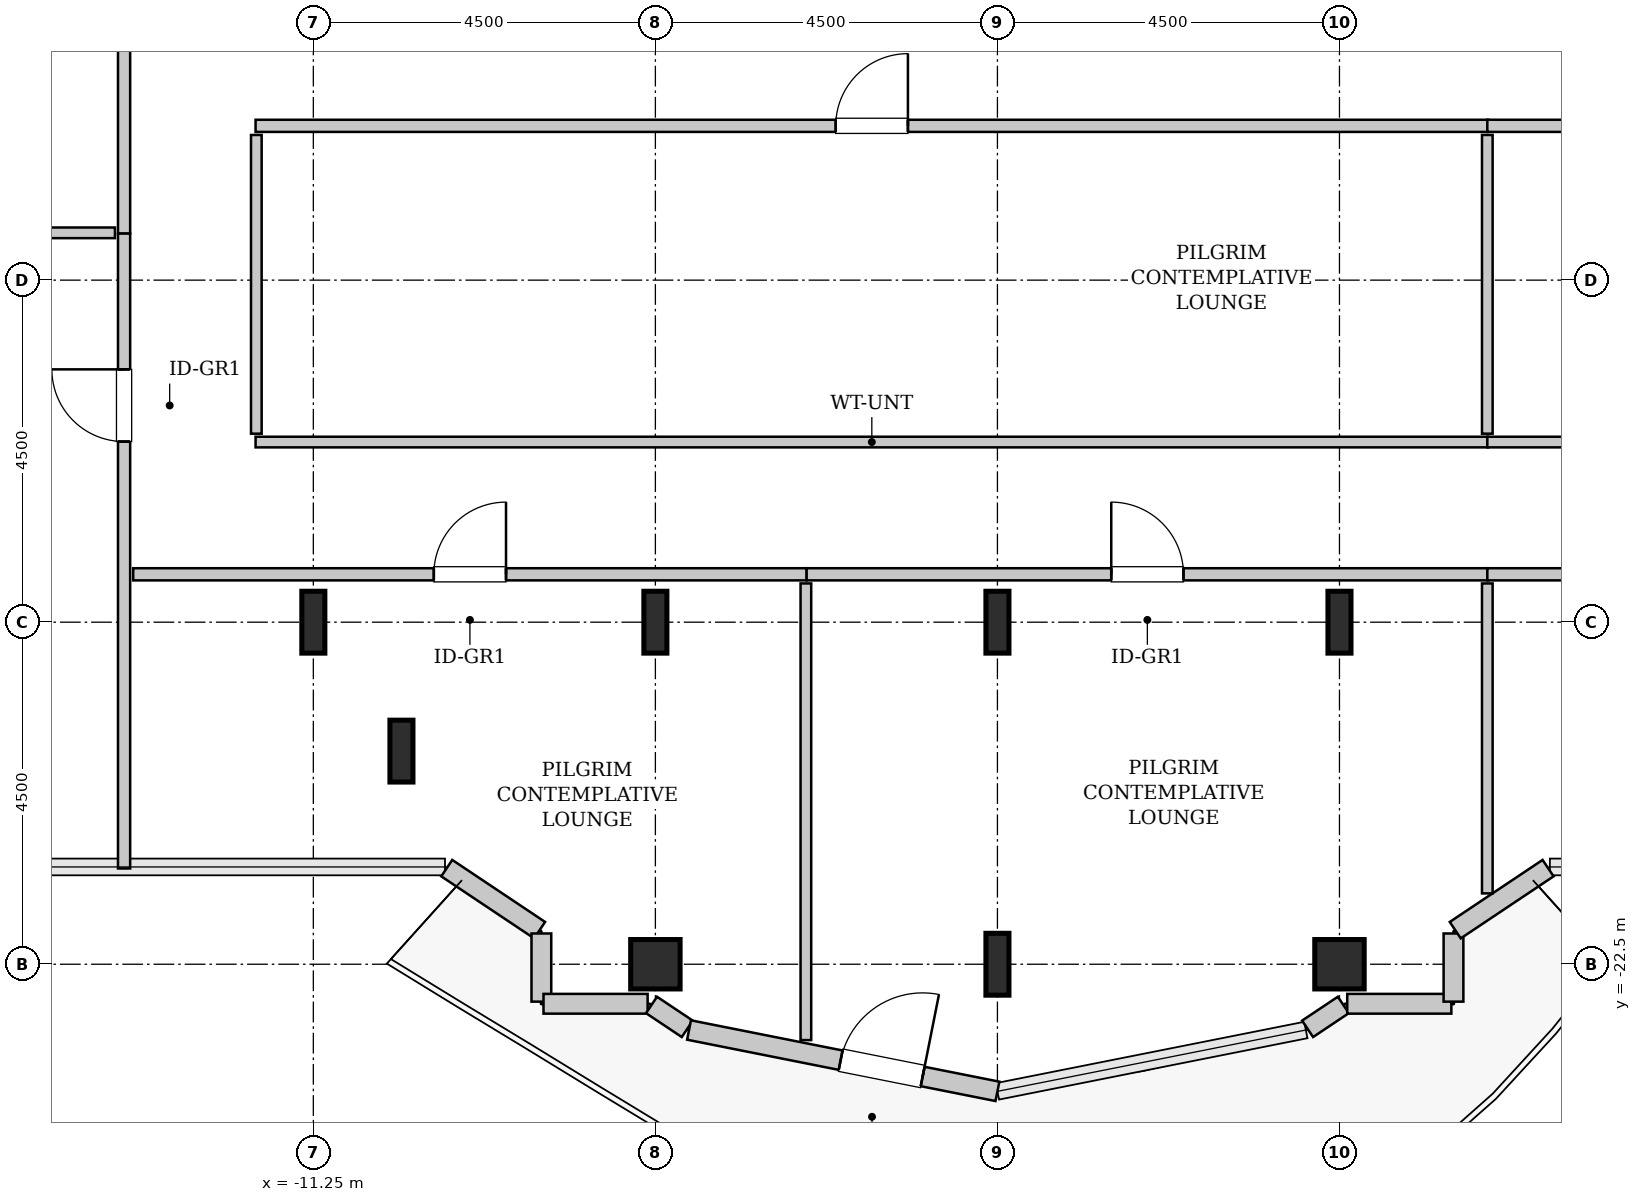
"""IFC4 building model, lengths in metres.
Left out: names, types, materials, properties, quantities, classifications, styles, units other than length and angle.
Written with IfcOpenShell. Run it as: python <this file> out.ifc"""

import sys

from ifc_helpers import new_model, si_unit, direction, frame, frame_2d, origin, origin_2d, place, context, subcontext, project, spatial, rectangle, hollow_rectangle, i_section, extrude, source, transform, mapped, element, fill, save


model = new_model("IFC4")
c1 = context("Model", 3, precision=1e-05, world=origin(), true_north=direction((0.0, 1.0)))
c2 = subcontext(c1, "Body", "Model", "MODEL_VIEW")
j1 = project(units=[si_unit("LENGTHUNIT", "METRE"), si_unit("PLANEANGLEUNIT", "RADIAN")], contexts=[c1])
p1 = place(None, origin())
s1 = spatial("IfcSite", under=j1, at=p1, CompositionType="ELEMENT")
p2 = place(p1, origin())
s2 = spatial("IfcBuilding", under=s1, at=p2, CompositionType="ELEMENT")
p3 = place(p2, frame((0.0, 0.0, 218.0)))
s3 = spatial("IfcBuildingStorey", under=s2, at=p3, CompositionType="ELEMENT", Elevation=218.0)
m1 = source(origin(), c2, "Body", "SweptSolid", [
    extrude(i_section(OverallWidth=0.303, OverallDepth=0.814, WebThickness=0.021, FlangeThickness=0.04, FilletRadius=0.03, at=origin_2d()), origin(), (0.0, 0.0, 1.0), 3.8),
])
for number, where, z_axis, x_axis in (
    (1, (-11.25, -18.0, 0.0), (0.0, 0.0, 1.0), (1.0, 0.0, 0.0)),
    (2, (-10.091, -19.696, 0.0), (0.0, 0.0, 1.0), (1.0, 0.0, 0.0)),
):
    element("IfcColumn", number, at=place(p3, frame(where, z_axis=z_axis, x_axis=x_axis)), inside=s3, PredefinedType="COLUMN", context=c2, shape_type="MappedRepresentation", body=[
        mapped(m1, transform((0.0, 0.0, 0.0), x_axis=(1.0, 0.0, 0.0), y_axis=(0.0, 1.0, 0.0), z_axis=(0.0, 0.0, 1.0), scale=1.0)),
    ])
m2 = source(origin(), c2, "Body", "SweptSolid", [
    extrude(hollow_rectangle(XDim=0.65, YDim=0.65, WallThickness=0.032, InnerFilletRadius=0.032, OuterFilletRadius=0.064, at=origin_2d()), origin(), (0.0, 0.0, 1.0), 3.8),
])
p4 = place(p3, frame((-6.75, -22.5, 0.0), z_axis=(0.0, 0.0, 1.0), x_axis=(1.0, 0.0, 0.0)))
e3 = element("IfcColumn", 3, at=p4, inside=s3, PredefinedType="COLUMN", context=c2, shape_type="MappedRepresentation", body=[
    mapped(m2, transform((0.0, 0.0, 0.0), x_axis=(1.0, 0.0, 0.0), y_axis=(0.0, 1.0, 0.0), z_axis=(0.0, 0.0, 1.0), scale=1.0)),
])
for number, where, z_axis, x_axis in (
    (4, (-6.75, -18.0, 0.0), (0.0, 0.0, 1.0), (1.0, 0.0, 0.0)),
    (5, (-2.25, -22.5, 0.0), (0.0, 0.0, 1.0), (1.0, 0.0, 0.0)),
    (6, (-2.25, -18.0, 0.0), (0.0, 0.0, 1.0), (1.0, 0.0, 0.0)),
):
    element("IfcColumn", number, at=place(p3, frame(where, z_axis=z_axis, x_axis=x_axis)), inside=s3, PredefinedType="COLUMN", context=c2, shape_type="MappedRepresentation", body=[
        mapped(m1, transform((0.0, 0.0, 0.0), x_axis=(1.0, 0.0, 0.0), y_axis=(0.0, 1.0, 0.0), z_axis=(0.0, 0.0, 1.0), scale=1.0)),
    ])
p5 = place(p3, frame((2.25, -22.5, 0.0), z_axis=(0.0, 0.0, 1.0), x_axis=(1.0, 0.0, 0.0)))
e7 = element("IfcColumn", 7, at=p5, inside=s3, PredefinedType="COLUMN", context=c2, shape_type="MappedRepresentation", body=[
    mapped(m2, transform((0.0, 0.0, 0.0), x_axis=(1.0, 0.0, 0.0), y_axis=(0.0, 1.0, 0.0), z_axis=(0.0, 0.0, 1.0), scale=1.0)),
])
p6 = place(p3, frame((2.25, -18.0, 0.0), z_axis=(0.0, 0.0, 1.0), x_axis=(1.0, 0.0, 0.0)))
e8 = element("IfcColumn", 8, at=p6, inside=s3, PredefinedType="COLUMN", context=c2, shape_type="MappedRepresentation", body=[
    mapped(m1, transform((0.0, 0.0, 0.0), x_axis=(1.0, 0.0, 0.0), y_axis=(0.0, 1.0, 0.0), z_axis=(0.0, 0.0, 1.0), scale=1.0)),
])
m3 = source(origin(), c2, "Body", "SweptSolid", [
    extrude(rectangle(XDim=1.469, YDim=0.26, at=frame_2d((0.734, 0.0))), origin(), (0.0, 0.0, 1.0), 3.55),
])
p7 = place(p3, frame((-9.495, -21.236, 0.0), z_axis=(0.0, 0.0, 1.0), x_axis=(0.831461760506, -0.555581983884, 0.0)))
e9 = element("IfcWall", 9, at=p7, inside=s3, PredefinedType="SOLIDWALL", context=c2, shape_type="MappedRepresentation", body=[
    mapped(m3, transform((0.0, 0.0, 0.0), x_axis=(1.0, 0.0, 0.0), y_axis=(0.0, 1.0, 0.0), z_axis=(0.0, 0.0, 1.0), scale=1.0)),
])
m4 = source(origin(), c2, "Body", "SweptSolid", [
    extrude(rectangle(XDim=0.897, YDim=0.26, at=frame_2d((0.448, 0.0))), origin(), (0.0, 0.0, 1.0), 3.55),
])
p8 = place(p3, frame((-8.25, -22.095, 0.0), z_axis=(0.0, 0.0, 1.0), x_axis=(0.0, -1.0, 0.0)))
e10 = element("IfcWall", 10, at=p8, inside=s3, PredefinedType="SOLIDWALL", context=c2, shape_type="MappedRepresentation", body=[
    mapped(m4, transform((0.0, 0.0, 0.0), x_axis=(1.0, 0.0, 0.0), y_axis=(0.0, 1.0, 0.0), z_axis=(0.0, 0.0, 1.0), scale=1.0)),
])
m5 = source(origin(), c2, "Body", "SweptSolid", [
    extrude(rectangle(XDim=1.37, YDim=0.26, at=frame_2d((0.685, 0.0))), origin(), (0.0, 0.0, 1.0), 3.55),
])
p9 = place(p3, frame((-8.222, -23.02, 0.0), z_axis=(0.0, 0.0, 1.0), x_axis=(1.0, 0.0, 0.0)))
e11 = element("IfcWall", 11, at=p9, inside=s3, PredefinedType="SOLIDWALL", context=c2, shape_type="MappedRepresentation", body=[
    mapped(m5, transform((0.0, 0.0, 0.0), x_axis=(1.0, 0.0, 0.0), y_axis=(0.0, 1.0, 0.0), z_axis=(0.0, 0.0, 1.0), scale=1.0)),
])
m6 = source(origin(), c2, "Body", "SweptSolid", [
    extrude(rectangle(XDim=0.565, YDim=0.26, at=frame_2d((0.283, 0.0))), origin(), (0.0, 0.0, 1.0), 3.55),
])
p10 = place(p3, frame((-6.801, -23.036, 0.0), z_axis=(0.0, 0.0, 1.0), x_axis=(0.831651492666, -0.555297933317, 0.0)))
e12 = element("IfcWall", 12, at=p10, inside=s3, PredefinedType="SOLIDWALL", context=c2, shape_type="MappedRepresentation", body=[
    mapped(m6, transform((0.0, 0.0, 0.0), x_axis=(1.0, 0.0, 0.0), y_axis=(0.0, 1.0, 0.0), z_axis=(0.0, 0.0, 1.0), scale=1.0)),
])
m7 = source(origin(), c2, "Body", "SweptSolid", [
    extrude(rectangle(XDim=4.137, YDim=0.26, at=frame_2d((2.068, 0.0))), origin(), (0.0, 0.0, 1.0), 3.55),
])
p11 = place(p3, frame((-6.307, -23.365, 0.0), z_axis=(0.0, 0.0, 1.0), x_axis=(0.980782170794, -0.195105954428, 0.0)))
e13 = element("IfcWall", 13, at=p11, inside=s3, PredefinedType="SOLIDWALL", context=c2, shape_type="MappedRepresentation", body=[
    mapped(m7, transform((0.0, 0.0, 0.0), x_axis=(1.0, 0.0, 0.0), y_axis=(0.0, 1.0, 0.0), z_axis=(0.0, 0.0, 1.0), scale=1.0)),
])
p12 = place(p11, frame((2.034, 0.0, 0.0)))
e14 = element("IfcOpeningElement", 14, at=p12, cuts=e13, PredefinedType="OPENING", context=c2, shape_type="SweptSolid", body=[
    extrude(rectangle(XDim=1.1, YDim=2.2, at=frame_2d((0.55, 1.1))), frame((0.0, 0.14, 0.0), z_axis=(0.0, -1.0, 0.0), x_axis=(1.0, 0.0, 0.0)), (0.0, 0.0, 1.0), 0.28),
])
p13 = place(p3, frame((1.831, -23.35, 0.0), z_axis=(0.0, 0.0, 1.0), x_axis=(0.831651492666, 0.555297933317, 0.0)))
e15 = element("IfcWall", 15, at=p13, inside=s3, PredefinedType="SOLIDWALL", context=c2, shape_type="MappedRepresentation", body=[
    mapped(m6, transform((0.0, 0.0, 0.0), x_axis=(1.0, 0.0, 0.0), y_axis=(0.0, 1.0, 0.0), z_axis=(0.0, 0.0, 1.0), scale=1.0)),
])
p14 = place(p3, frame((2.352, -23.02, 0.0), z_axis=(0.0, 0.0, 1.0), x_axis=(1.0, 0.0, 0.0)))
e16 = element("IfcWall", 16, at=p14, inside=s3, PredefinedType="SOLIDWALL", context=c2, shape_type="MappedRepresentation", body=[
    mapped(m5, transform((0.0, 0.0, 0.0), x_axis=(1.0, 0.0, 0.0), y_axis=(0.0, 1.0, 0.0), z_axis=(0.0, 0.0, 1.0), scale=1.0)),
])
p15 = place(p3, frame((3.75, -22.992, 0.0), z_axis=(0.0, 0.0, 1.0), x_axis=(0.0, 1.0, 0.0)))
e17 = element("IfcWall", 17, at=p15, inside=s3, PredefinedType="SOLIDWALL", context=c2, shape_type="MappedRepresentation", body=[
    mapped(m4, transform((0.0, 0.0, 0.0), x_axis=(1.0, 0.0, 0.0), y_axis=(0.0, 1.0, 0.0), z_axis=(0.0, 0.0, 1.0), scale=1.0)),
])
p16 = place(p3, frame((3.773, -22.052, 0.0), z_axis=(0.0, 0.0, 1.0), x_axis=(0.831461760506, 0.555581983884, 0.0)))
e18 = element("IfcWall", 18, at=p16, inside=s3, PredefinedType="SOLIDWALL", context=c2, shape_type="MappedRepresentation", body=[
    mapped(m3, transform((0.0, 0.0, 0.0), x_axis=(1.0, 0.0, 0.0), y_axis=(0.0, 1.0, 0.0), z_axis=(0.0, 0.0, 1.0), scale=1.0)),
])
m8 = source(origin(), c2, "Body", "SweptSolid", [
    extrude(rectangle(XDim=10.093, YDim=0.16, at=frame_2d((5.046, 0.0))), origin(), (0.0, 0.0, 1.0), 3.535),
])
p17 = place(p3, frame((-13.74, -12.887, 0.0), z_axis=(0.0, 0.0, 1.0), x_axis=(0.0, 1.0, 0.0)))
e19 = element("IfcWall", 19, at=p17, inside=s3, PredefinedType="PARTITIONING", context=c2, shape_type="MappedRepresentation", body=[
    mapped(m8, transform((0.0, 0.0, 0.0), x_axis=(1.0, 0.0, 0.0), y_axis=(0.0, 1.0, 0.0), z_axis=(0.0, 0.0, 1.0), scale=1.0)),
])
p18 = place(p17, frame((4.571, 0.0, 0.0)))
e20 = element("IfcOpeningElement", 20, at=p18, cuts=e19, PredefinedType="OPENING", context=c2, shape_type="SweptSolid", body=[
    extrude(rectangle(XDim=0.95, YDim=2.1, at=frame_2d((0.475, 1.05))), frame((0.0, 0.09, 0.0), z_axis=(0.0, -1.0, 0.0), x_axis=(1.0, 0.0, 0.0)), (0.0, 0.0, 1.0), 0.18),
])
m9 = source(origin(), c2, "Body", "SweptSolid", [
    extrude(rectangle(XDim=11.43, YDim=0.14, at=frame_2d((5.715, 0.0))), origin(), (0.0, 0.0, 1.0), 3.535),
])
p19 = place(p3, frame((-25.29, -12.877, 0.0), z_axis=(0.0, 0.0, 1.0), x_axis=(1.0, 0.0, 0.0)))
e21 = element("IfcWall", 21, at=p19, inside=s3, PredefinedType="PARTITIONING", context=c2, shape_type="MappedRepresentation", body=[
    mapped(m9, transform((0.0, 0.0, 0.0), x_axis=(1.0, 0.0, 0.0), y_axis=(0.0, 1.0, 0.0), z_axis=(0.0, 0.0, 1.0), scale=1.0)),
])
m10 = source(origin(), c2, "Body", "SweptSolid", [
    extrude(rectangle(XDim=8.353, YDim=0.16, at=frame_2d((4.176, 0.0))), origin(), (0.0, 0.0, 1.0), 3.535),
])
p20 = place(p3, frame((-13.74, -21.24, 0.0), z_axis=(0.0, 0.0, 1.0), x_axis=(0.0, 1.0, 0.0)))
e22 = element("IfcWall", 22, at=p20, inside=s3, PredefinedType="PARTITIONING", context=c2, shape_type="MappedRepresentation", body=[
    mapped(m10, transform((0.0, 0.0, 0.0), x_axis=(1.0, 0.0, 0.0), y_axis=(0.0, 1.0, 0.0), z_axis=(0.0, 0.0, 1.0), scale=1.0)),
])
p21 = place(p20, frame((5.616, 0.0, 0.0)))
e23 = element("IfcOpeningElement", 23, at=p21, cuts=e22, PredefinedType="OPENING", context=c2, shape_type="SweptSolid", body=[
    extrude(rectangle(XDim=0.95, YDim=2.1, at=frame_2d((0.475, 1.05))), frame((0.0, 0.09, 0.0), z_axis=(0.0, -1.0, 0.0), x_axis=(1.0, 0.0, 0.0)), (0.0, 0.0, 1.0), 0.18),
])
m11 = source(origin(), c2, "Body", "SweptSolid", [
    extrude(rectangle(XDim=8.86, YDim=0.16, at=frame_2d((4.43, 0.0))), origin(), (0.0, 0.0, 1.0), 3.535),
])
p22 = place(p3, frame((-13.62, -17.37, 0.0), z_axis=(0.0, 0.0, 1.0), x_axis=(1.0, 0.0, 0.0)))
e24 = element("IfcWall", 24, at=p22, inside=s3, PredefinedType="PARTITIONING", context=c2, shape_type="MappedRepresentation", body=[
    mapped(m11, transform((0.0, 0.0, 0.0), x_axis=(1.0, 0.0, 0.0), y_axis=(0.0, 1.0, 0.0), z_axis=(0.0, 0.0, 1.0), scale=1.0)),
])
p23 = place(p22, frame((3.955, 0.0, 0.0)))
e25 = element("IfcOpeningElement", 25, at=p23, cuts=e24, PredefinedType="OPENING", context=c2, shape_type="SweptSolid", body=[
    extrude(rectangle(XDim=0.95, YDim=2.1, at=frame_2d((0.475, 1.05))), frame((0.0, 0.09, 0.0), z_axis=(0.0, -1.0, 0.0), x_axis=(1.0, 0.0, 0.0)), (0.0, 0.0, 1.0), 0.18),
])
m12 = source(origin(), c2, "Body", "SweptSolid", [
    extrude(rectangle(XDim=6.008, YDim=0.14, at=frame_2d((3.004, 0.0))), origin(), (0.0, 0.0, 1.0), 3.535),
])
p24 = place(p3, frame((-4.77, -23.498, 0.0), z_axis=(0.0, 0.0, 1.0), x_axis=(0.0, 1.0, 0.0)))
e26 = element("IfcWall", 26, at=p24, inside=s3, PredefinedType="PARTITIONING", context=c2, shape_type="MappedRepresentation", body=[
    mapped(m12, transform((0.0, 0.0, 0.0), x_axis=(1.0, 0.0, 0.0), y_axis=(0.0, 1.0, 0.0), z_axis=(0.0, 0.0, 1.0), scale=1.0)),
])
m13 = source(origin(), c2, "Body", "SweptSolid", [
    extrude(rectangle(XDim=8.965, YDim=0.16, at=frame_2d((4.482, 0.0))), origin(), (0.0, 0.0, 1.0), 3.535),
])
p25 = place(p3, frame((-4.76, -17.37, 0.0), z_axis=(0.0, 0.0, 1.0), x_axis=(1.0, 0.0, 0.0)))
e27 = element("IfcWall", 27, at=p25, inside=s3, PredefinedType="PARTITIONING", context=c2, shape_type="MappedRepresentation", body=[
    mapped(m13, transform((0.0, 0.0, 0.0), x_axis=(1.0, 0.0, 0.0), y_axis=(0.0, 1.0, 0.0), z_axis=(0.0, 0.0, 1.0), scale=1.0)),
])
p26 = place(p25, frame((4.008, 0.0, 0.0)))
e28 = element("IfcOpeningElement", 28, at=p26, cuts=e27, PredefinedType="OPENING", context=c2, shape_type="SweptSolid", body=[
    extrude(rectangle(XDim=0.95, YDim=2.1, at=frame_2d((0.475, 1.05))), frame((0.0, 0.09, 0.0), z_axis=(0.0, -1.0, 0.0), x_axis=(1.0, 0.0, 0.0)), (0.0, 0.0, 1.0), 0.18),
])
m14 = source(origin(), c2, "Body", "SweptSolid", [
    extrude(rectangle(XDim=4.078, YDim=0.14, at=frame_2d((2.039, 0.0))), origin(), (0.0, 0.0, 1.0), 3.535),
])
p27 = place(p3, frame((4.195, -21.568, 0.0), z_axis=(0.0, 0.0, 1.0), x_axis=(0.0, 1.0, 0.0)))
e29 = element("IfcWall", 29, at=p27, inside=s3, PredefinedType="PARTITIONING", context=c2, shape_type="MappedRepresentation", body=[
    mapped(m14, transform((0.0, 0.0, 0.0), x_axis=(1.0, 0.0, 0.0), y_axis=(0.0, 1.0, 0.0), z_axis=(0.0, 0.0, 1.0), scale=1.0)),
])
m15 = source(origin(), c2, "Body", "SweptSolid", [
    extrude(rectangle(XDim=16.215, YDim=0.16, at=frame_2d((8.107, 0.0))), origin(), (0.0, 0.0, 1.0), 3.535),
])
p28 = place(p3, frame((-12.01, -11.47, 0.0), z_axis=(0.0, 0.0, 1.0), x_axis=(1.0, 0.0, 0.0)))
e30 = element("IfcWall", 30, at=p28, inside=s3, PredefinedType="PARTITIONING", context=c2, shape_type="MappedRepresentation", body=[
    mapped(m15, transform((0.0, 0.0, 0.0), x_axis=(1.0, 0.0, 0.0), y_axis=(0.0, 1.0, 0.0), z_axis=(0.0, 0.0, 1.0), scale=1.0)),
])
p29 = place(p28, frame((7.633, 0.0, 0.0)))
e31 = element("IfcOpeningElement", 31, at=p29, cuts=e30, PredefinedType="OPENING", context=c2, shape_type="SweptSolid", body=[
    extrude(rectangle(XDim=0.95, YDim=2.1, at=frame_2d((0.475, 1.05))), frame((0.0, 0.09, 0.0), z_axis=(0.0, -1.0, 0.0), x_axis=(1.0, 0.0, 0.0)), (0.0, 0.0, 1.0), 0.18),
])
m16 = source(origin(), c2, "Body", "SweptSolid", [
    extrude(rectangle(XDim=16.215, YDim=0.14, at=frame_2d((8.107, 0.0))), origin(), (0.0, 0.0, 1.0), 3.535),
])
p30 = place(p3, frame((-12.01, -15.63, 0.0), z_axis=(0.0, 0.0, 1.0), x_axis=(1.0, 0.0, 0.0)))
e32 = element("IfcWall", 32, at=p30, inside=s3, PredefinedType="PARTITIONING", context=c2, shape_type="MappedRepresentation", body=[
    mapped(m16, transform((0.0, 0.0, 0.0), x_axis=(1.0, 0.0, 0.0), y_axis=(0.0, 1.0, 0.0), z_axis=(0.0, 0.0, 1.0), scale=1.0)),
])
m17 = source(origin(), c2, "Body", "SweptSolid", [
    extrude(rectangle(XDim=3.93, YDim=0.14, at=frame_2d((1.965, 0.0))), origin(), (0.0, 0.0, 1.0), 3.535),
])
for number, where, z_axis, x_axis in (
    (33, (-12.0, -15.52, 0.0), (0.0, 0.0, 1.0), (0.0, 1.0, 0.0)),
    (34, (4.195, -15.52, 0.0), (0.0, 0.0, 1.0), (0.0, 1.0, 0.0)),
):
    element("IfcWall", number, at=place(p3, frame(where, z_axis=z_axis, x_axis=x_axis)), inside=s3, PredefinedType="PARTITIONING", context=c2, shape_type="MappedRepresentation", body=[
        mapped(m17, transform((0.0, 0.0, 0.0), x_axis=(1.0, 0.0, 0.0), y_axis=(0.0, 1.0, 0.0), z_axis=(0.0, 0.0, 1.0), scale=1.0)),
    ])
m18 = source(origin(), c2, "Body", "SweptSolid", [
    extrude(rectangle(XDim=9.425, YDim=0.16, at=frame_2d((4.712, 0.0))), origin(), (0.0, 0.0, 1.0), 3.535),
])
p31 = place(p3, frame((4.195, -17.37, 0.0), z_axis=(0.0, 0.0, 1.0), x_axis=(1.0, 0.0, 0.0)))
e35 = element("IfcWall", 35, at=p31, inside=s3, PredefinedType="PARTITIONING", context=c2, shape_type="MappedRepresentation", body=[
    mapped(m18, transform((0.0, 0.0, 0.0), x_axis=(1.0, 0.0, 0.0), y_axis=(0.0, 1.0, 0.0), z_axis=(0.0, 0.0, 1.0), scale=1.0)),
])
p32 = place(p31, frame((4.238, 0.0, 0.0)))
e36 = element("IfcOpeningElement", 36, at=p32, cuts=e35, PredefinedType="OPENING", context=c2, shape_type="SweptSolid", body=[
    extrude(rectangle(XDim=0.95, YDim=2.1, at=frame_2d((0.475, 1.05))), frame((0.0, 0.09, 0.0), z_axis=(0.0, -1.0, 0.0), x_axis=(1.0, 0.0, 0.0)), (0.0, 0.0, 1.0), 0.18),
])
m19 = source(origin(), c2, "Body", "SweptSolid", [
    extrude(rectangle(XDim=7.815, YDim=0.16, at=frame_2d((3.907, 0.0))), origin(), (0.0, 0.0, 1.0), 3.535),
])
p33 = place(p3, frame((4.195, -11.47, 0.0), z_axis=(0.0, 0.0, 1.0), x_axis=(1.0, 0.0, 0.0)))
e37 = element("IfcWall", 37, at=p33, inside=s3, PredefinedType="PARTITIONING", context=c2, shape_type="MappedRepresentation", body=[
    mapped(m19, transform((0.0, 0.0, 0.0), x_axis=(1.0, 0.0, 0.0), y_axis=(0.0, 1.0, 0.0), z_axis=(0.0, 0.0, 1.0), scale=1.0)),
])
p34 = place(p33, frame((3.433, 0.0, 0.0)))
e38 = element("IfcOpeningElement", 38, at=p34, cuts=e37, PredefinedType="OPENING", context=c2, shape_type="SweptSolid", body=[
    extrude(rectangle(XDim=0.95, YDim=2.1, at=frame_2d((0.475, 1.05))), frame((0.0, 0.09, 0.0), z_axis=(0.0, -1.0, 0.0), x_axis=(1.0, 0.0, 0.0)), (0.0, 0.0, 1.0), 0.18),
])
m20 = source(origin(), c2, "Body", "SweptSolid", [
    extrude(rectangle(XDim=7.815, YDim=0.14, at=frame_2d((3.907, 0.0))), origin(), (0.0, 0.0, 1.0), 3.535),
])
p35 = place(p3, frame((4.195, -15.63, 0.0), z_axis=(0.0, 0.0, 1.0), x_axis=(1.0, 0.0, 0.0)))
e39 = element("IfcWall", 39, at=p35, inside=s3, PredefinedType="PARTITIONING", context=c2, shape_type="MappedRepresentation", body=[
    mapped(m20, transform((0.0, 0.0, 0.0), x_axis=(1.0, 0.0, 0.0), y_axis=(0.0, 1.0, 0.0), z_axis=(0.0, 0.0, 1.0), scale=1.0)),
])
m21 = source(origin(), c2, "Body", "SweptSolid", [
    extrude(rectangle(XDim=1.1, YDim=2.2, at=frame_2d((0.55, 1.1))), frame((0.0, 0.025, 0.0), z_axis=(0.0, -1.0, 0.0), x_axis=(1.0, 0.0, 0.0)), (0.0, 0.0, 1.0), 0.05),
])
p36 = place(p12, origin())
e40 = element("IfcDoor", 40, at=p36, inside=s3, OperationType="SINGLE_SWING_RIGHT", PredefinedType="DOOR", context=c2, shape_type="MappedRepresentation", body=[
    mapped(m21, transform((0.0, 0.0, 0.0), x_axis=(1.0, 0.0, 0.0), y_axis=(0.0, 1.0, 0.0), z_axis=(0.0, 0.0, 1.0), scale=1.0)),
])
fill(e14, e40)
m22 = source(origin(), c2, "Body", "SweptSolid", [
    extrude(rectangle(XDim=0.95, YDim=2.1, at=frame_2d((0.475, 1.05))), frame((0.0, 0.025, 0.0), z_axis=(0.0, -1.0, 0.0), x_axis=(1.0, 0.0, 0.0)), (0.0, 0.0, 1.0), 0.05),
])
p37 = place(p21, origin())
e41 = element("IfcDoor", 41, at=p37, inside=s3, OperationType="SINGLE_SWING_RIGHT", PredefinedType="DOOR", context=c2, shape_type="MappedRepresentation", body=[
    mapped(m22, transform((0.0, 0.0, 0.0), x_axis=(1.0, 0.0, 0.0), y_axis=(0.0, 1.0, 0.0), z_axis=(0.0, 0.0, 1.0), scale=1.0)),
])
fill(e23, e41)
p38 = place(p23, origin())
e42 = element("IfcDoor", 42, at=p38, inside=s3, OperationType="SINGLE_SWING_RIGHT", PredefinedType="DOOR", context=c2, shape_type="MappedRepresentation", body=[
    mapped(m22, transform((0.0, 0.0, 0.0), x_axis=(1.0, 0.0, 0.0), y_axis=(0.0, 1.0, 0.0), z_axis=(0.0, 0.0, 1.0), scale=1.0)),
])
fill(e25, e42)
p39 = place(p26, origin())
e43 = element("IfcDoor", 43, at=p39, inside=s3, OperationType="SINGLE_SWING_LEFT", PredefinedType="DOOR", context=c2, shape_type="MappedRepresentation", body=[
    mapped(m22, transform((0.0, 0.0, 0.0), x_axis=(1.0, 0.0, 0.0), y_axis=(0.0, 1.0, 0.0), z_axis=(0.0, 0.0, 1.0), scale=1.0)),
])
fill(e28, e43)
p40 = place(p29, origin())
e44 = element("IfcDoor", 44, at=p40, inside=s3, OperationType="SINGLE_SWING_RIGHT", PredefinedType="DOOR", context=c2, shape_type="MappedRepresentation", body=[
    mapped(m22, transform((0.0, 0.0, 0.0), x_axis=(1.0, 0.0, 0.0), y_axis=(0.0, 1.0, 0.0), z_axis=(0.0, 0.0, 1.0), scale=1.0)),
])
fill(e31, e44)
save(model, sys.argv[1])
